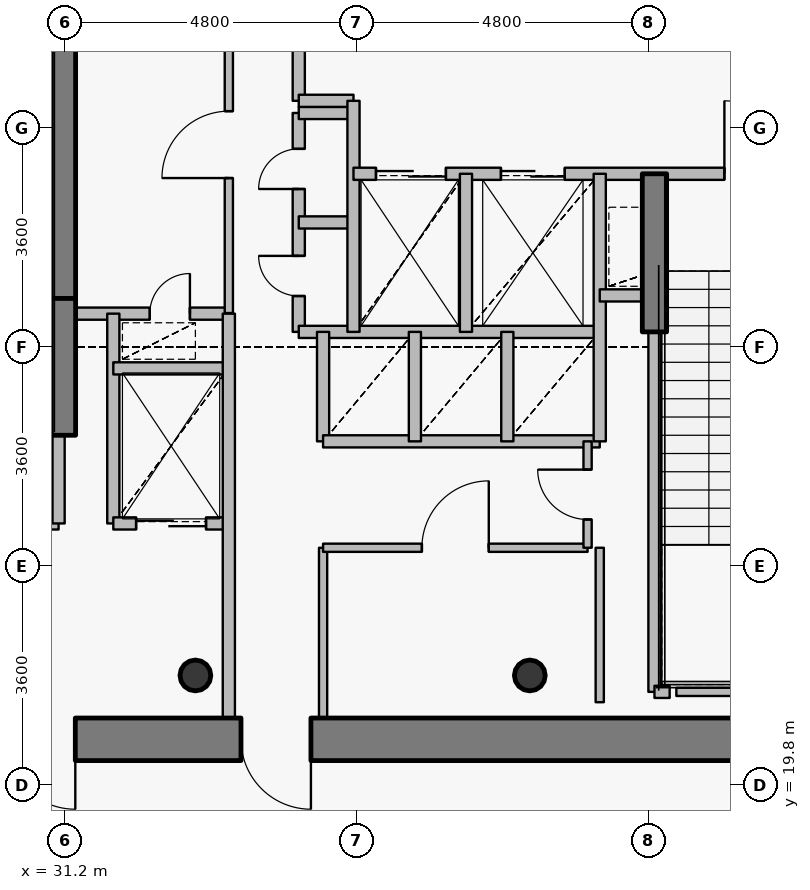
"""IFC4 building model, lengths in metres.
Left out: names, types, materials, properties, quantities, classifications, styles, units other than length and angle.
Written with IfcOpenShell. Run it as: python <this file> out.ifc"""

import sys

from ifc_helpers import new_model, si_unit, direction, frame, frame_2d, origin, origin_2d, place, context, subcontext, project, spatial, rectangle, hollow_circle, extrude, source, transform, mapped, element, fill, save


model = new_model("IFC4")
c1 = context("Model", 3, precision=1e-05, world=origin(), true_north=direction((0.0, 1.0)))
c2 = subcontext(c1, "Body", "Model", "MODEL_VIEW")
j1 = project(units=[si_unit("LENGTHUNIT", "METRE"), si_unit("PLANEANGLEUNIT", "RADIAN")], contexts=[c1])
p1 = place(None, origin())
s1 = spatial("IfcSite", under=j1, at=p1, CompositionType="ELEMENT")
p2 = place(p1, origin())
s2 = spatial("IfcBuilding", under=s1, at=p2, CompositionType="ELEMENT")
p3 = place(p2, frame((0.0, 0.0, 363.6)))
s3 = spatial("IfcBuildingStorey", under=s2, at=p3, CompositionType="ELEMENT", Elevation=363.6)
for number, where, z_axis, x_axis in (
    (1, (33.35, 21.6, 0.0), (0.0, 0.0, 1.0), (1.0, 0.0, 0.0)),
    (2, (38.85, 21.6, 0.0), (0.0, 0.0, 1.0), (1.0, 0.0, 0.0)),
):
    element("IfcColumn", number, at=place(p3, frame(where, z_axis=z_axis, x_axis=x_axis)), inside=s3, PredefinedType="COLUMN", context=c2, shape_type="SweptSolid", body=[
        extrude(hollow_circle(Radius=0.254, WallThickness=0.02, at=origin_2d()), origin(), (0.0, 0.0, 1.0), 4.8),
    ])
p4 = place(p3, frame((31.18, 27.8, 0.0), z_axis=(0.0, 0.0, 1.0), x_axis=(0.0, 1.0, 0.0)))
e3 = element("IfcWall", 3, at=p4, inside=s3, PredefinedType="SHEAR", context=c2, shape_type="SweptSolid", body=[
    extrude(rectangle(XDim=4.75, YDim=0.4, at=frame_2d((2.375, 0.0))), origin(), (0.0, 0.0, 1.0), 4.8),
])
p5 = place(p3, frame((44.45, 20.55, 0.0), z_axis=(0.0, 0.0, 1.0), x_axis=(-1.0, 0.0, 0.0)))
e4 = element("IfcWall", 4, at=p5, inside=s3, PredefinedType="SHEAR", context=c2, shape_type="SweptSolid", body=[
    extrude(rectangle(XDim=16.9, YDim=0.7, at=frame_2d((8.45, 0.0))), origin(), (0.0, 0.0, 1.0), 4.05),
])
p6 = place(p5, frame((13.075, 0.0, 0.0)))
e5 = element("IfcOpeningElement", 5, at=p6, cuts=e4, PredefinedType="OPENING", context=c2, shape_type="SweptSolid", body=[
    extrude(rectangle(XDim=1.15, YDim=2.15, at=origin_2d()), frame((0.575, 0.36, 1.075), z_axis=(0.0, -1.0, 0.0), x_axis=(1.0, 0.0, 0.0)), (0.0, 0.0, 1.0), 0.72),
])
p7 = place(p5, frame((9.2, 0.0, 0.0)))
e6 = element("IfcOpeningElement", 6, at=p7, cuts=e4, PredefinedType="OPENING", context=c2, shape_type="SweptSolid", body=[
    extrude(rectangle(XDim=1.15, YDim=2.15, at=origin_2d()), frame((0.575, 0.36, 1.075), z_axis=(0.0, -1.0, 0.0), x_axis=(1.0, 0.0, 0.0)), (0.0, 0.0, 1.0), 0.72),
])
p8 = place(p3, frame((31.18, 25.55, 0.0), z_axis=(0.0, 0.0, 1.0), x_axis=(0.0, 1.0, 0.0)))
e7 = element("IfcWall", 7, at=p8, inside=s3, PredefinedType="SHEAR", context=c2, shape_type="SweptSolid", body=[
    extrude(rectangle(XDim=2.25, YDim=0.4, at=frame_2d((1.125, 0.0))), origin(), (0.0, 0.0, 1.0), 4.1),
])
p9 = place(p3, frame((40.9, 27.25, 0.0), z_axis=(0.0, 0.0, 1.0), x_axis=(0.0, 1.0, 0.0)))
e8 = element("IfcWall", 8, at=p9, inside=s3, PredefinedType="SHEAR", context=c2, shape_type="SweptSolid", body=[
    extrude(rectangle(XDim=2.6, YDim=0.4, at=frame_2d((1.3, 0.0))), origin(), (0.0, 0.0, 1.0), 4.1),
])
p10 = place(p3, frame((27.56, 24.1, 0.0), z_axis=(0.0, 0.0, 1.0), x_axis=(1.0, 0.0, 0.0)))
e9 = element("IfcWall", 9, at=p10, inside=s3, PredefinedType="PARTITIONING", context=c2, shape_type="SweptSolid", body=[
    extrude(rectangle(XDim=3.54, YDim=0.2, at=frame_2d((1.77, 0.0))), origin(), (0.0, 0.0, 1.0), 4.5),
])
p11 = place(p10, frame((1.17, 0.0, 0.0)))
e10 = element("IfcOpeningElement", 10, at=p11, cuts=e9, PredefinedType="OPENING", context=c2, shape_type="SweptSolid", body=[
    extrude(rectangle(XDim=1.2, YDim=2.15, at=origin_2d()), frame((0.6, 0.11, 1.075), z_axis=(0.0, -1.0, 0.0), x_axis=(1.0, 0.0, 0.0)), (0.0, 0.0, 1.0), 0.22),
])
p12 = place(p3, frame((31.1, 24.1, 0.0), z_axis=(0.0, 0.0, 1.0), x_axis=(0.0, 1.0, 0.0)))
e11 = element("IfcWall", 11, at=p12, inside=s3, PredefinedType="PARTITIONING", context=c2, shape_type="SweptSolid", body=[
    extrude(rectangle(XDim=1.44, YDim=0.2, at=frame_2d((0.72, 0.0))), origin(), (0.0, 0.0, 1.0), 4.5),
])
p13 = place(p3, frame((31.1, 27.55, 0.0), z_axis=(0.0, 0.0, 1.0), x_axis=(1.0, 0.0, 0.0)))
e12 = element("IfcWall", 12, at=p13, inside=s3, PredefinedType="PARTITIONING", context=c2, shape_type="SweptSolid", body=[
    extrude(rectangle(XDim=2.8, YDim=0.2, at=frame_2d((1.4, 0.0))), origin(), (0.0, 0.0, 1.0), 4.085),
])
p14 = place(p13, frame((1.5, 0.0, 0.0)))
e13 = element("IfcOpeningElement", 13, at=p14, cuts=e12, PredefinedType="OPENING", context=c2, shape_type="SweptSolid", body=[
    extrude(rectangle(XDim=0.66, YDim=2.05, at=origin_2d()), frame((0.33, 0.11, 1.025), z_axis=(0.0, -1.0, 0.0), x_axis=(1.0, 0.0, 0.0)), (0.0, 0.0, 1.0), 0.22),
])
p15 = place(p3, frame((32.0, 24.1, 0.0), z_axis=(0.0, 0.0, 1.0), x_axis=(0.0, 1.0, 0.0)))
e14 = element("IfcWall", 14, at=p15, inside=s3, PredefinedType="PARTITIONING", context=c2, shape_type="SweptSolid", body=[
    extrude(rectangle(XDim=3.45, YDim=0.2, at=frame_2d((1.725, 0.0))), origin(), (0.0, 0.0, 1.0), 4.5),
])
p16 = place(p3, frame((32.0, 24.1, 0.0), z_axis=(0.0, 0.0, 1.0), x_axis=(1.0, 0.0, 0.0)))
e15 = element("IfcWall", 15, at=p16, inside=s3, PredefinedType="PARTITIONING", context=c2, shape_type="SweptSolid", body=[
    extrude(rectangle(XDim=1.9, YDim=0.2, at=frame_2d((0.95, 0.0))), origin(), (0.0, 0.0, 1.0), 4.085),
])
p17 = place(p16, frame((0.375, 0.0, 0.0)))
e16 = element("IfcOpeningElement", 16, at=p17, cuts=e15, PredefinedType="OPENING", context=c2, shape_type="SweptSolid", body=[
    extrude(rectangle(XDim=1.15, YDim=2.15, at=origin_2d()), frame((0.575, 0.11, 1.075), z_axis=(0.0, -1.0, 0.0), x_axis=(1.0, 0.0, 0.0)), (0.0, 0.0, 1.0), 0.22),
])
p18 = place(p3, frame((32.0, 26.65, 0.0), z_axis=(0.0, 0.0, 1.0), x_axis=(1.0, 0.0, 0.0)))
e17 = element("IfcWall", 17, at=p18, inside=s3, PredefinedType="PARTITIONING", context=c2, shape_type="SweptSolid", body=[
    extrude(rectangle(XDim=1.9, YDim=0.2, at=frame_2d((0.95, 0.0))), origin(), (0.0, 0.0, 1.0), 4.085),
])
p19 = place(p3, frame((33.9, 20.9, 0.0), z_axis=(0.0, 0.0, 1.0), x_axis=(0.0, 1.0, 0.0)))
e18 = element("IfcWall", 18, at=p19, inside=s3, PredefinedType="PARTITIONING", context=c2, shape_type="SweptSolid", body=[
    extrude(rectangle(XDim=6.65, YDim=0.2, at=frame_2d((3.325, 0.0))), origin(), (0.0, 0.0, 1.0), 4.085),
])
p20 = place(p3, frame((33.9, 27.56, 0.0), z_axis=(0.0, 0.0, 1.0), x_axis=(0.0, 1.0, 0.0)))
e19 = element("IfcWall", 19, at=p20, inside=s3, PredefinedType="PARTITIONING", context=c2, shape_type="SweptSolid", body=[
    extrude(rectangle(XDim=5.54, YDim=0.135, at=frame_2d((2.77, 0.0))), origin(), (0.0, 0.0, 1.0), 4.085),
])
p21 = place(p20, frame((2.22, 0.0, 0.0)))
e20 = element("IfcOpeningElement", 20, at=p21, cuts=e19, PredefinedType="OPENING", context=c2, shape_type="SweptSolid", body=[
    extrude(rectangle(XDim=1.1, YDim=2.15, at=origin_2d()), frame((0.55, 0.078, 1.075), z_axis=(0.0, -1.0, 0.0), x_axis=(1.0, 0.0, 0.0)), (0.0, 0.0, 1.0), 0.155),
])
p22 = place(p3, frame((35.05, 27.25, 0.0), z_axis=(0.0, 0.0, 1.0), x_axis=(0.0, 1.0, 0.0)))
e21 = element("IfcWall", 21, at=p22, inside=s3, PredefinedType="PARTITIONING", context=c2, shape_type="SweptSolid", body=[
    extrude(rectangle(XDim=3.6, YDim=0.2, at=frame_2d((1.8, 0.0))), origin(), (0.0, 0.0, 1.0), 4.5),
])
p23 = place(p22, frame((0.59, 0.0, 0.0)))
e22 = element("IfcOpeningElement", 22, at=p23, cuts=e21, PredefinedType="OPENING", context=c2, shape_type="SweptSolid", body=[
    extrude(rectangle(XDim=0.66, YDim=2.05, at=origin_2d()), frame((0.33, 0.11, 1.025), z_axis=(0.0, -1.0, 0.0), x_axis=(1.0, 0.0, 0.0)), (0.0, 0.0, 1.0), 0.22),
])
p24 = place(p22, frame((2.35, 0.0, 0.0)))
e23 = element("IfcOpeningElement", 23, at=p24, cuts=e21, PredefinedType="OPENING", context=c2, shape_type="SweptSolid", body=[
    extrude(rectangle(XDim=0.66, YDim=2.05, at=origin_2d()), frame((0.33, 0.11, 1.025), z_axis=(0.0, -1.0, 0.0), x_axis=(1.0, 0.0, 0.0)), (0.0, 0.0, 1.0), 0.22),
])
p25 = place(p3, frame((35.05, 27.25, 0.0), z_axis=(0.0, 0.0, 1.0), x_axis=(1.0, 0.0, 0.0)))
e24 = element("IfcWall", 24, at=p25, inside=s3, PredefinedType="PARTITIONING", context=c2, shape_type="SweptSolid", body=[
    extrude(rectangle(XDim=4.95, YDim=0.2, at=frame_2d((2.475, 0.0))), origin(), (0.0, 0.0, 1.0), 4.085),
])
for number, where, z_axis, x_axis in (
    (25, (35.05, 29.05, 0.0), (0.0, 0.0, 1.0), (1.0, 0.0, 0.0)),
    (26, (35.05, 30.85, 0.0), (0.0, 0.0, 1.0), (1.0, 0.0, 0.0)),
):
    element("IfcWall", number, at=place(p3, frame(where, z_axis=z_axis, x_axis=x_axis)), inside=s3, PredefinedType="PARTITIONING", context=c2, shape_type="SweptSolid", body=[
        extrude(rectangle(XDim=0.9, YDim=0.2, at=frame_2d((0.45, 0.0))), origin(), (0.0, 0.0, 1.0), 4.5),
    ])
p26 = place(p3, frame((35.05, 31.05, 0.0), z_axis=(0.0, 0.0, 1.0), x_axis=(0.0, 1.0, 0.0)))
e27 = element("IfcWall", 27, at=p26, inside=s3, PredefinedType="PARTITIONING", context=c2, shape_type="SweptSolid", body=[
    extrude(rectangle(XDim=2.05, YDim=0.2, at=frame_2d((1.025, 0.0))), origin(), (0.0, 0.0, 1.0), 4.085),
])
p27 = place(p3, frame((35.05, 31.05, 0.0), z_axis=(0.0, 0.0, 1.0), x_axis=(1.0, 0.0, 0.0)))
e28 = element("IfcWall", 28, at=p27, inside=s3, PredefinedType="PARTITIONING", context=c2, shape_type="SweptSolid", body=[
    extrude(rectangle(XDim=0.9, YDim=0.2, at=frame_2d((0.45, 0.0))), origin(), (0.0, 0.0, 1.0), 4.5),
])
p28 = place(p3, frame((35.45, 20.9, 0.0), z_axis=(0.0, 0.0, 1.0), x_axis=(0.0, 1.0, 0.0)))
e29 = element("IfcWall", 29, at=p28, inside=s3, PredefinedType="PARTITIONING", context=c2, shape_type="SweptSolid", body=[
    extrude(rectangle(XDim=2.8, YDim=0.135, at=frame_2d((1.4, 0.0))), origin(), (0.0, 0.0, 1.0), 4.085),
])
p29 = place(p3, frame((35.45, 23.7, 0.0), z_axis=(0.0, 0.0, 1.0), x_axis=(1.0, 0.0, 0.0)))
e30 = element("IfcWall", 30, at=p29, inside=s3, PredefinedType="PARTITIONING", context=c2, shape_type="SweptSolid", body=[
    extrude(rectangle(XDim=4.35, YDim=0.135, at=frame_2d((2.175, 0.0))), origin(), (0.0, 0.0, 1.0), 4.085),
])
p30 = place(p29, frame((1.625, 0.0, 0.0)))
e31 = element("IfcOpeningElement", 31, at=p30, cuts=e30, PredefinedType="OPENING", context=c2, shape_type="SweptSolid", body=[
    extrude(rectangle(XDim=1.1, YDim=2.15, at=origin_2d()), frame((0.55, 0.078, 1.075), z_axis=(0.0, -1.0, 0.0), x_axis=(1.0, 0.0, 0.0)), (0.0, 0.0, 1.0), 0.155),
])
p31 = place(p3, frame((35.45, 25.45, 0.0), z_axis=(0.0, 0.0, 1.0), x_axis=(0.0, 1.0, 0.0)))
e32 = element("IfcWall", 32, at=p31, inside=s3, PredefinedType="PARTITIONING", context=c2, shape_type="SweptSolid", body=[
    extrude(rectangle(XDim=1.8, YDim=0.2, at=frame_2d((0.9, 0.0))), origin(), (0.0, 0.0, 1.0), 4.5),
])
p32 = place(p3, frame((35.45, 25.45, 0.0), z_axis=(0.0, 0.0, 1.0), x_axis=(1.0, 0.0, 0.0)))
e33 = element("IfcWall", 33, at=p32, inside=s3, PredefinedType="PARTITIONING", context=c2, shape_type="SweptSolid", body=[
    extrude(rectangle(XDim=4.55, YDim=0.2, at=frame_2d((2.275, 0.0))), origin(), (0.0, 0.0, 1.0), 4.085),
])
p33 = place(p3, frame((35.95, 27.25, 0.0), z_axis=(0.0, 0.0, 1.0), x_axis=(0.0, 1.0, 0.0)))
e34 = element("IfcWall", 34, at=p33, inside=s3, PredefinedType="PARTITIONING", context=c2, shape_type="SweptSolid", body=[
    extrude(rectangle(XDim=3.8, YDim=0.2, at=frame_2d((1.9, 0.0))), origin(), (0.0, 0.0, 1.0), 4.5),
])
p34 = place(p3, frame((35.95, 29.85, 0.0), z_axis=(0.0, 0.0, 1.0), x_axis=(1.0, 0.0, 0.0)))
e35 = element("IfcWall", 35, at=p34, inside=s3, PredefinedType="PARTITIONING", context=c2, shape_type="SweptSolid", body=[
    extrude(rectangle(XDim=8.49, YDim=0.2, at=frame_2d((4.245, 0.0))), origin(), (0.0, 0.0, 1.0), 4.085),
])
p35 = place(p34, frame((6.1, 0.0, 0.0)))
e36 = element("IfcOpeningElement", 36, at=p35, cuts=e35, PredefinedType="OPENING", context=c2, shape_type="SweptSolid", body=[
    extrude(rectangle(XDim=1.2, YDim=2.15, at=origin_2d()), frame((0.6, 0.11, 1.075), z_axis=(0.0, -1.0, 0.0), x_axis=(1.0, 0.0, 0.0)), (0.0, 0.0, 1.0), 0.22),
])
p36 = place(p34, frame((0.37, 0.0, 0.0)))
e37 = element("IfcOpeningElement", 37, at=p36, cuts=e35, PredefinedType="OPENING", context=c2, shape_type="SweptSolid", body=[
    extrude(rectangle(XDim=1.15, YDim=2.15, at=origin_2d()), frame((0.575, 0.11, 1.075), z_axis=(0.0, -1.0, 0.0), x_axis=(1.0, 0.0, 0.0)), (0.0, 0.0, 1.0), 0.22),
])
p37 = place(p34, frame((2.425, 0.0, 0.0)))
e38 = element("IfcOpeningElement", 38, at=p37, cuts=e35, PredefinedType="OPENING", context=c2, shape_type="SweptSolid", body=[
    extrude(rectangle(XDim=1.05, YDim=2.15, at=origin_2d()), frame((0.525, 0.11, 1.075), z_axis=(0.0, -1.0, 0.0), x_axis=(1.0, 0.0, 0.0)), (0.0, 0.0, 1.0), 0.22),
])
p38 = place(p3, frame((36.96, 25.45, 0.0), z_axis=(0.0, 0.0, 1.0), x_axis=(0.0, 1.0, 0.0)))
e39 = element("IfcWall", 39, at=p38, inside=s3, PredefinedType="PARTITIONING", context=c2, shape_type="SweptSolid", body=[
    extrude(rectangle(XDim=1.8, YDim=0.2, at=frame_2d((0.9, 0.0))), origin(), (0.0, 0.0, 1.0), 4.5),
])
p39 = place(p3, frame((37.8, 27.25, 0.0), z_axis=(0.0, 0.0, 1.0), x_axis=(0.0, 1.0, 0.0)))
e40 = element("IfcWall", 40, at=p39, inside=s3, PredefinedType="PARTITIONING", context=c2, shape_type="SweptSolid", body=[
    extrude(rectangle(XDim=2.6, YDim=0.2, at=frame_2d((1.3, 0.0))), origin(), (0.0, 0.0, 1.0), 4.5),
])
p40 = place(p3, frame((38.48, 25.45, 0.0), z_axis=(0.0, 0.0, 1.0), x_axis=(0.0, 1.0, 0.0)))
e41 = element("IfcWall", 41, at=p40, inside=s3, PredefinedType="PARTITIONING", context=c2, shape_type="SweptSolid", body=[
    extrude(rectangle(XDim=1.8, YDim=0.2, at=frame_2d((0.9, 0.0))), origin(), (0.0, 0.0, 1.0), 4.5),
])
p41 = place(p3, frame((39.8, 23.7, 0.0), z_axis=(0.0, 0.0, 1.0), x_axis=(0.0, 1.0, 0.0)))
e42 = element("IfcWall", 42, at=p41, inside=s3, PredefinedType="PARTITIONING", context=c2, shape_type="SweptSolid", body=[
    extrude(rectangle(XDim=1.75, YDim=0.135, at=frame_2d((0.875, 0.0))), origin(), (0.0, 0.0, 1.0), 4.5),
])
p42 = place(p41, frame((0.465, 0.0, 0.0)))
e43 = element("IfcOpeningElement", 43, at=p42, cuts=e42, PredefinedType="OPENING", context=c2, shape_type="SweptSolid", body=[
    extrude(rectangle(XDim=0.82, YDim=2.1, at=origin_2d()), frame((0.41, 0.078, 1.05), z_axis=(0.0, -1.0, 0.0), x_axis=(1.0, 0.0, 0.0)), (0.0, 0.0, 1.0), 0.155),
])
p43 = place(p3, frame((40.0, 25.45, 0.0), z_axis=(0.0, 0.0, 1.0), x_axis=(0.0, 1.0, 0.0)))
e44 = element("IfcWall", 44, at=p43, inside=s3, PredefinedType="PARTITIONING", context=c2, shape_type="SweptSolid", body=[
    extrude(rectangle(XDim=4.4, YDim=0.2, at=frame_2d((2.2, 0.0))), origin(), (0.0, 0.0, 1.0), 4.5),
])
p44 = place(p3, frame((40.0, 27.85, 0.0), z_axis=(0.0, 0.0, 1.0), x_axis=(1.0, 0.0, 0.0)))
e45 = element("IfcWall", 45, at=p44, inside=s3, PredefinedType="PARTITIONING", context=c2, shape_type="SweptSolid", body=[
    extrude(rectangle(XDim=0.9, YDim=0.2, at=frame_2d((0.45, 0.0))), origin(), (0.0, 0.0, 1.0), 4.5),
])
p45 = place(p3, frame((40.9, 21.33, 0.0), z_axis=(0.0, 0.0, 1.0), x_axis=(0.0, 1.0, 0.0)))
e46 = element("IfcWall", 46, at=p45, inside=s3, PredefinedType="PARTITIONING", context=c2, shape_type="SweptSolid", body=[
    extrude(rectangle(XDim=5.91, YDim=0.2, at=frame_2d((2.955, 0.0))), origin(), (0.0, 0.0, 1.0), 4.035),
])
p46 = place(p3, frame((40.9, 21.33, 0.0), z_axis=(0.0, 0.0, 1.0), x_axis=(1.0, 0.0, 0.0)))
e47 = element("IfcWall", 47, at=p46, inside=s3, PredefinedType="PARTITIONING", context=c2, shape_type="SweptSolid", body=[
    extrude(rectangle(XDim=0.25, YDim=0.2, at=frame_2d((0.125, 0.0))), origin(), (0.0, 0.0, 1.0), 4.035),
])
p47 = place(p3, frame((44.24, 21.33, 0.0), z_axis=(0.0, 0.0, 1.0), x_axis=(-1.0, 0.0, 0.0)))
e48 = element("IfcWall", 48, at=p47, inside=s3, PredefinedType="PARTITIONING", context=c2, shape_type="SweptSolid", body=[
    extrude(rectangle(XDim=2.98, YDim=0.135, at=frame_2d((1.49, 0.0))), origin(), (0.0, 0.0, 1.0), 4.035),
])
p48 = place(p3, frame((40.0, 23.7, 0.0), z_axis=(0.0, 0.0, 1.0), x_axis=(0.0, -1.0, 0.0)))
e49 = element("IfcWall", 49, at=p48, inside=s3, PredefinedType="PARTITIONING", context=c2, shape_type="SweptSolid", body=[
    extrude(rectangle(XDim=2.54, YDim=0.135, at=frame_2d((1.27, 0.0))), origin(), (0.0, 0.0, 1.0), 4.035),
])
m1 = source(origin(), c2, "Body", "SweptSolid", [
    extrude(rectangle(XDim=1.15, YDim=2.15, at=origin_2d()), frame((0.575, 0.025, 1.075), z_axis=(0.0, -1.0, 0.0), x_axis=(1.0, 0.0, 0.0)), (0.0, 0.0, 1.0), 0.05),
])
p49 = place(p6, origin())
e50 = element("IfcDoor", 50, at=p49, inside=s3, OperationType="SINGLE_SWING_LEFT", PredefinedType="DOOR", context=c2, shape_type="MappedRepresentation", body=[
    mapped(m1, transform((0.0, 0.0, 0.0), x_axis=(1.0, 0.0, 0.0), y_axis=(0.0, 1.0, 0.0), z_axis=(0.0, 0.0, 1.0), scale=1.0)),
])
fill(e5, e50)
p50 = place(p7, origin())
e51 = element("IfcDoor", 51, at=p50, inside=s3, OperationType="SINGLE_SWING_LEFT", PredefinedType="DOOR", context=c2, shape_type="MappedRepresentation", body=[
    mapped(m1, transform((0.0, 0.0, 0.0), x_axis=(1.0, 0.0, 0.0), y_axis=(0.0, 1.0, 0.0), z_axis=(0.0, 0.0, 1.0), scale=1.0)),
])
fill(e6, e51)
m2 = source(origin(), c2, "Body", "SweptSolid", [
    extrude(rectangle(XDim=1.2, YDim=2.15, at=origin_2d()), frame((0.6, 0.025, 1.075), z_axis=(0.0, -1.0, 0.0), x_axis=(1.0, 0.0, 0.0)), (0.0, 0.0, 1.0), 0.05),
])
p51 = place(p35, origin())
e52 = element("IfcDoor", 52, at=p51, inside=s3, OperationType="SINGLE_SWING_LEFT", PredefinedType="DOOR", context=c2, shape_type="MappedRepresentation", body=[
    mapped(m2, transform((0.0, 0.0, 0.0), x_axis=(1.0, 0.0, 0.0), y_axis=(0.0, 1.0, 0.0), z_axis=(0.0, 0.0, 1.0), scale=1.0)),
])
fill(e36, e52)
m3 = source(origin(), c2, "Body", "SweptSolid", [
    extrude(rectangle(XDim=1.15, YDim=2.15, at=origin_2d()), frame((0.575, 0.025, 1.075), z_axis=(0.0, -1.0, 0.0), x_axis=(1.0, 0.0, 0.0)), (0.0, 0.0, 1.0), 0.05),
])
p52 = place(p36, origin())
e53 = element("IfcDoor", 53, at=p52, inside=s3, OperationType="DOUBLE_DOOR_SLIDING", PredefinedType="USERDEFINED", context=c2, shape_type="MappedRepresentation", body=[
    mapped(m3, transform((0.0, 0.0, 0.0), x_axis=(1.0, 0.0, 0.0), y_axis=(0.0, 1.0, 0.0), z_axis=(0.0, 0.0, 1.0), scale=1.0)),
])
fill(e37, e53)
p53 = place(p17, origin())
e54 = element("IfcDoor", 54, at=p53, inside=s3, OperationType="DOUBLE_DOOR_SLIDING", PredefinedType="USERDEFINED", context=c2, shape_type="MappedRepresentation", body=[
    mapped(m3, transform((0.0, 0.0, 0.0), x_axis=(1.0, 0.0, 0.0), y_axis=(0.0, 1.0, 0.0), z_axis=(0.0, 0.0, 1.0), scale=1.0)),
])
fill(e16, e54)
m4 = source(origin(), c2, "Body", "SweptSolid", [
    extrude(rectangle(XDim=1.05, YDim=2.15, at=origin_2d()), frame((0.525, 0.025, 1.075), z_axis=(0.0, -1.0, 0.0), x_axis=(1.0, 0.0, 0.0)), (0.0, 0.0, 1.0), 0.05),
])
p54 = place(p37, origin())
e55 = element("IfcDoor", 55, at=p54, inside=s3, OperationType="DOUBLE_DOOR_SLIDING", PredefinedType="USERDEFINED", context=c2, shape_type="MappedRepresentation", body=[
    mapped(m4, transform((0.0, 0.0, 0.0), x_axis=(1.0, 0.0, 0.0), y_axis=(0.0, 1.0, 0.0), z_axis=(0.0, 0.0, 1.0), scale=1.0)),
])
fill(e38, e55)
m5 = source(origin(), c2, "Body", "SweptSolid", [
    extrude(rectangle(XDim=0.66, YDim=2.05, at=origin_2d()), frame((0.33, 0.025, 1.025), z_axis=(0.0, -1.0, 0.0), x_axis=(1.0, 0.0, 0.0)), (0.0, 0.0, 1.0), 0.05),
])
p55 = place(p23, origin())
e56 = element("IfcDoor", 56, at=p55, inside=s3, OperationType="SINGLE_SWING_RIGHT", PredefinedType="USERDEFINED", context=c2, shape_type="MappedRepresentation", body=[
    mapped(m5, transform((0.0, 0.0, 0.0), x_axis=(1.0, 0.0, 0.0), y_axis=(0.0, 1.0, 0.0), z_axis=(0.0, 0.0, 1.0), scale=1.0)),
])
fill(e22, e56)
p56 = place(p24, origin())
e57 = element("IfcDoor", 57, at=p56, inside=s3, OperationType="SINGLE_SWING_LEFT", PredefinedType="USERDEFINED", context=c2, shape_type="MappedRepresentation", body=[
    mapped(m5, transform((0.0, 0.0, 0.0), x_axis=(1.0, 0.0, 0.0), y_axis=(0.0, 1.0, 0.0), z_axis=(0.0, 0.0, 1.0), scale=1.0)),
])
fill(e23, e57)
m6 = source(origin(), c2, "Body", "SweptSolid", [
    extrude(rectangle(XDim=1.1, YDim=2.15, at=origin_2d()), frame((0.55, 0.025, 1.075), z_axis=(0.0, -1.0, 0.0), x_axis=(1.0, 0.0, 0.0)), (0.0, 0.0, 1.0), 0.05),
])
p57 = place(p30, origin())
e58 = element("IfcDoor", 58, at=p57, inside=s3, OperationType="SINGLE_SWING_RIGHT", PredefinedType="DOOR", context=c2, shape_type="MappedRepresentation", body=[
    mapped(m6, transform((0.0, 0.0, 0.0), x_axis=(1.0, 0.0, 0.0), y_axis=(0.0, 1.0, 0.0), z_axis=(0.0, 0.0, 1.0), scale=1.0)),
])
fill(e31, e58)
p58 = place(p21, origin())
e59 = element("IfcDoor", 59, at=p58, inside=s3, OperationType="SINGLE_SWING_LEFT", PredefinedType="DOOR", context=c2, shape_type="MappedRepresentation", body=[
    mapped(m6, transform((0.0, 0.0, 0.0), x_axis=(1.0, 0.0, 0.0), y_axis=(0.0, 1.0, 0.0), z_axis=(0.0, 0.0, 1.0), scale=1.0)),
])
fill(e20, e59)
m7 = source(origin(), c2, "Body", "SweptSolid", [
    extrude(rectangle(XDim=0.82, YDim=2.1, at=origin_2d()), frame((0.41, 0.025, 1.05), z_axis=(0.0, -1.0, 0.0), x_axis=(1.0, 0.0, 0.0)), (0.0, 0.0, 1.0), 0.05),
])
p59 = place(p42, origin())
e60 = element("IfcDoor", 60, at=p59, inside=s3, OperationType="SINGLE_SWING_RIGHT", PredefinedType="DOOR", context=c2, shape_type="MappedRepresentation", body=[
    mapped(m7, transform((0.0, 0.0, 0.0), x_axis=(1.0, 0.0, 0.0), y_axis=(0.0, 1.0, 0.0), z_axis=(0.0, 0.0, 1.0), scale=1.0)),
])
fill(e43, e60)
p60 = place(p14, origin())
e61 = element("IfcDoor", 61, at=p60, inside=s3, OperationType="SINGLE_SWING_RIGHT", PredefinedType="USERDEFINED", context=c2, shape_type="MappedRepresentation", body=[
    mapped(m5, transform((0.0, 0.0, 0.0), x_axis=(1.0, 0.0, 0.0), y_axis=(0.0, 1.0, 0.0), z_axis=(0.0, 0.0, 1.0), scale=1.0)),
])
fill(e13, e61)
save(model, sys.argv[1])
